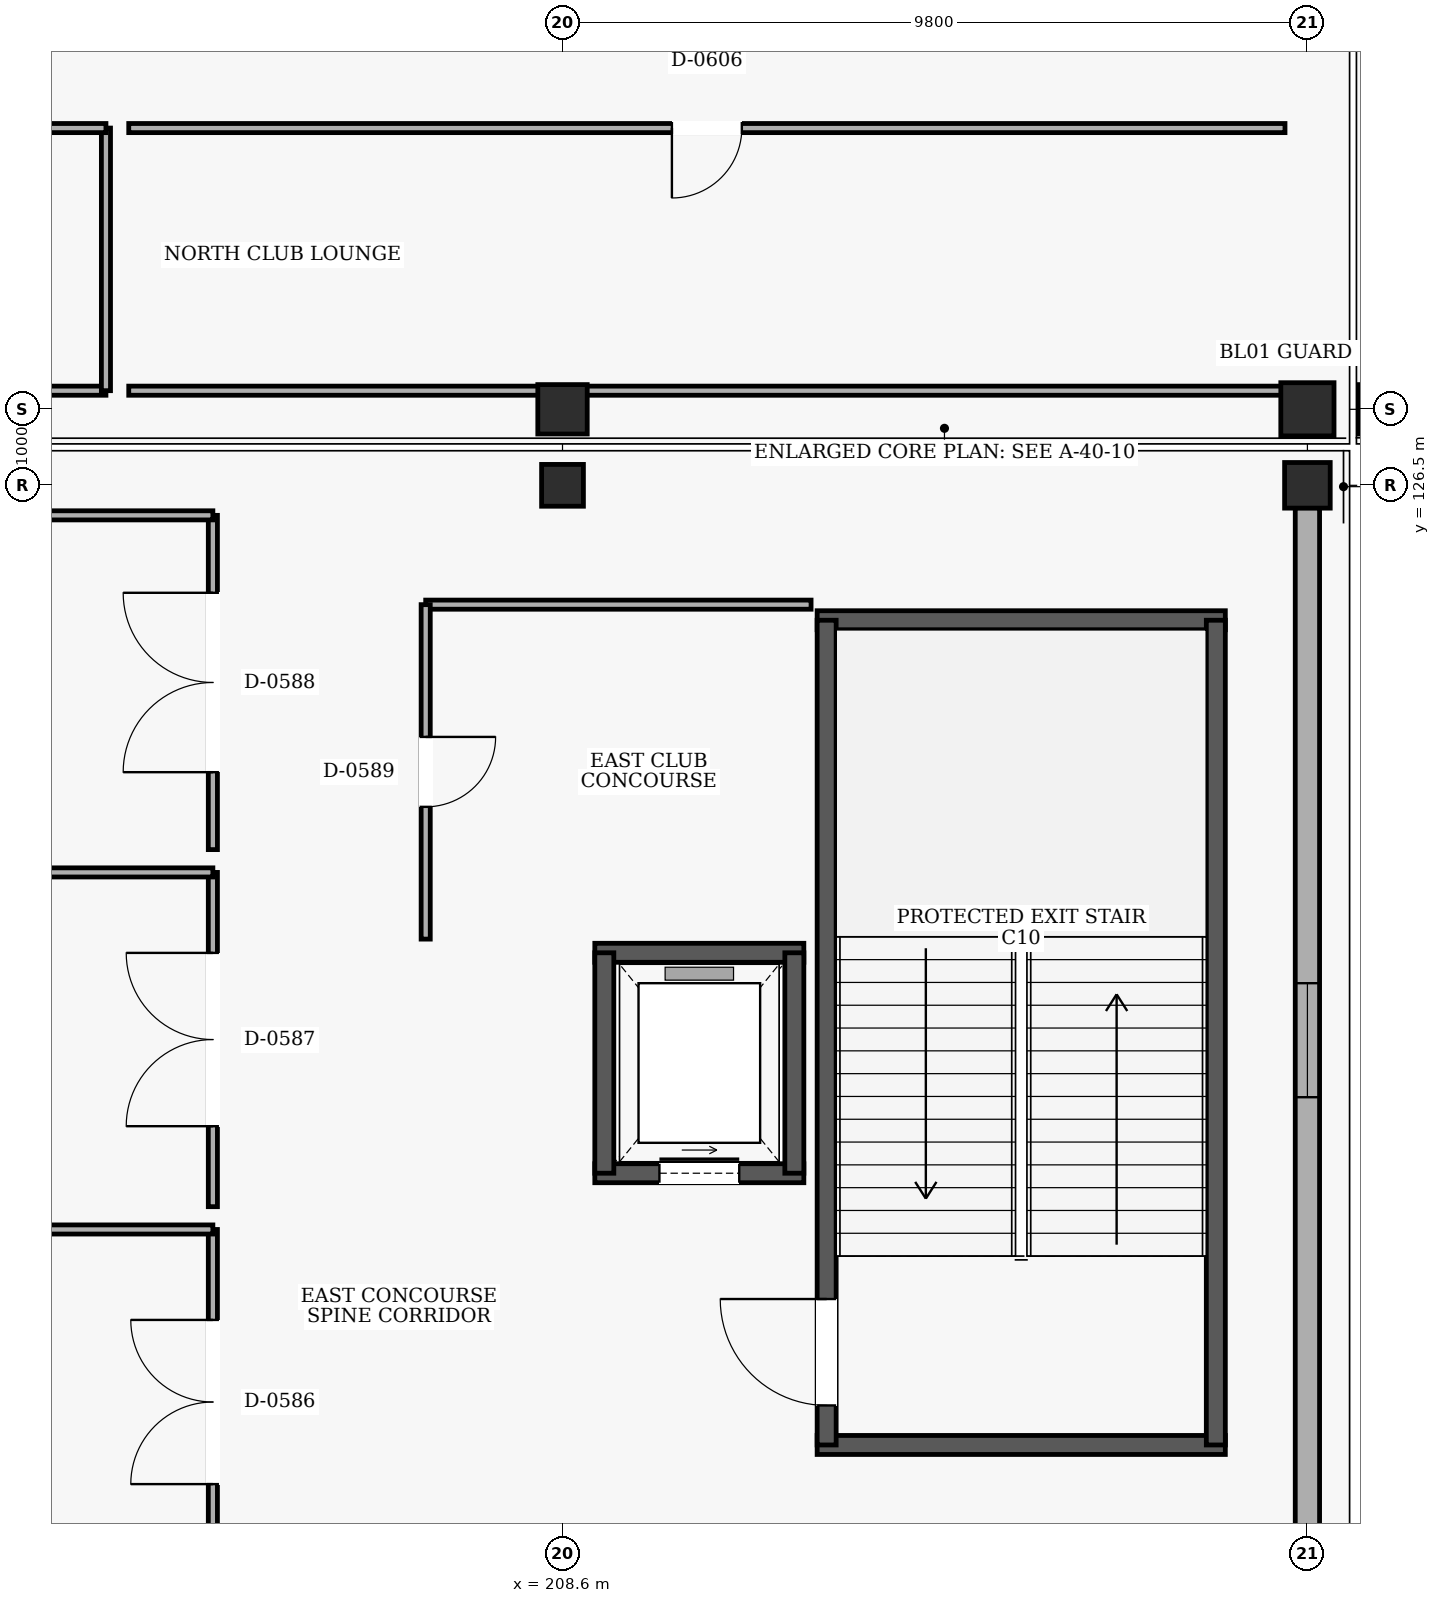
"""IFC4 building model, lengths in metres.
Left out: names, types, materials, properties, quantities, classifications, styles, units other than length and angle.
Written with IfcOpenShell. Run it as: python <this file> out.ifc"""

import sys

from ifc_helpers import new_model, si_unit, direction, frame, frame_2d, origin, origin_2d, place, context, subcontext, project, spatial, rectangle, extrude, element, fill, save


model = new_model("IFC4")
c1 = context("Model", 3, precision=1e-05, world=origin(), true_north=direction((0.0, 1.0)))
c2 = subcontext(c1, "Body", "Model", "MODEL_VIEW")
j1 = project(units=[si_unit("LENGTHUNIT", "METRE"), si_unit("PLANEANGLEUNIT", "RADIAN")], contexts=[c1])
p1 = place(None, origin())
s1 = spatial("IfcSite", under=j1, at=p1, CompositionType="ELEMENT")
p2 = place(p1, origin())
s2 = spatial("IfcBuilding", under=s1, at=p2, CompositionType="ELEMENT")
p3 = place(p2, frame((0.0, 0.0, 10.2)))
s3 = spatial("IfcBuildingStorey", under=s2, at=p3, CompositionType="ELEMENT", Elevation=10.2)
p4 = place(p3, frame((208.6, 126.5, 0.0), z_axis=(0.0, 0.0, 1.0), x_axis=(1.0, 0.0, 0.0)))
e1 = element("IfcColumn", 1, at=p4, inside=s3, PredefinedType="COLUMN", context=c2, shape_type="SweptSolid", body=[
    extrude(rectangle(XDim=0.55, YDim=0.55, at=origin_2d()), origin(), (0.0, 0.0, 1.0), 4.8),
])
p5 = place(p3, frame((208.6, 127.5, 0.0), z_axis=(0.0, 0.0, 1.0), x_axis=(1.0, 0.0, 0.0)))
e2 = element("IfcColumn", 2, at=p5, inside=s3, PredefinedType="COLUMN", context=c2, shape_type="SweptSolid", body=[
    extrude(rectangle(XDim=0.65, YDim=0.65, at=origin_2d()), origin(), (0.0, 0.0, 1.0), 4.8),
])
p6 = place(p3, frame((218.4, 126.5, 0.0), z_axis=(0.0, 0.0, 1.0), x_axis=(1.0, 0.0, 0.0)))
e3 = element("IfcColumn", 3, at=p6, inside=s3, PredefinedType="COLUMN", context=c2, shape_type="SweptSolid", body=[
    extrude(rectangle(XDim=0.6, YDim=0.6, at=origin_2d()), origin(), (0.0, 0.0, 1.0), 4.8),
])
p7 = place(p3, frame((218.4, 127.5, 0.0), z_axis=(0.0, 0.0, 1.0), x_axis=(1.0, 0.0, 0.0)))
e4 = element("IfcColumn", 4, at=p7, inside=s3, PredefinedType="COLUMN", context=c2, shape_type="SweptSolid", body=[
    extrude(rectangle(XDim=0.7, YDim=0.7, at=origin_2d()), origin(), (0.0, 0.0, 1.0), 4.8),
])
p8 = place(p3, frame((219.4, 127.5, 0.0), z_axis=(0.0, 0.0, 1.0), x_axis=(1.0, 0.0, 0.0)))
e5 = element("IfcColumn", 5, at=p8, inside=s3, PredefinedType="COLUMN", context=c2, shape_type="SweptSolid", body=[
    extrude(rectangle(XDim=0.65, YDim=0.65, at=origin_2d()), origin(), (0.0, 0.0, 1.0), 4.8),
])
p9 = place(p3, frame((218.4, 126.205, 0.0), z_axis=(0.0, 0.0, 1.0), x_axis=(0.0, -1.0, 0.0)))
e6 = element("IfcWall", 6, at=p9, inside=s3, PredefinedType="SOLIDWALL", context=c2, shape_type="SweptSolid", body=[
    extrude(rectangle(XDim=14.01, YDim=0.32, at=frame_2d((7.005, 0.0))), origin(), (0.0, 0.0, 1.0), 3.56),
])
p10 = place(p9, frame((6.255, 0.0, 0.9)))
e7 = element("IfcOpeningElement", 7, at=p10, cuts=e6, PredefinedType="OPENING", context=c2, shape_type="SweptSolid", body=[
    extrude(rectangle(XDim=1.5, YDim=1.8, at=frame_2d((0.75, 0.9))), frame((0.0, 0.17, 0.0), z_axis=(0.0, -1.0, 0.0), x_axis=(1.0, 0.0, 0.0)), (0.0, 0.0, 1.0), 0.34),
])
for number, where, z_axis, x_axis in (
    (8, (211.95, 113.875, 0.0), (0.0, 0.0, 1.0), (1.0, 0.0, 0.0)),
    (9, (217.32, 124.725, 0.0), (0.0, 0.0, 1.0), (-1.0, 0.0, 0.0)),
):
    element("IfcWall", number, at=place(p3, frame(where, z_axis=z_axis, x_axis=x_axis)), inside=s3, PredefinedType="SHEAR", context=c2, shape_type="SweptSolid", body=[
        extrude(rectangle(XDim=5.37, YDim=0.25, at=frame_2d((2.685, 0.0))), origin(), (0.0, 0.0, 1.0), 4.48),
    ])
p11 = place(p3, frame((212.075, 113.875, 0.0), z_axis=(0.0, 0.0, 1.0), x_axis=(0.0, 1.0, 0.0)))
e10 = element("IfcWall", 10, at=p11, inside=s3, PredefinedType="SHEAR", context=c2, shape_type="SweptSolid", body=[
    extrude(rectangle(XDim=10.85, YDim=0.25, at=frame_2d((5.425, 0.0))), origin(), (0.0, 0.0, 1.0), 4.48),
])
p12 = place(p11, frame((0.52, 0.0, 0.0)))
e11 = element("IfcOpeningElement", 11, at=p12, cuts=e10, PredefinedType="OPENING", context=c2, shape_type="SweptSolid", body=[
    extrude(rectangle(XDim=1.4, YDim=2.15, at=frame_2d((0.7, 1.075))), frame((0.0, 0.135, 0.0), z_axis=(0.0, -1.0, 0.0), x_axis=(1.0, 0.0, 0.0)), (0.0, 0.0, 1.0), 0.27),
])
p13 = place(p3, frame((217.195, 113.875, 0.0), z_axis=(0.0, 0.0, 1.0), x_axis=(0.0, 1.0, 0.0)))
e12 = element("IfcWall", 12, at=p13, inside=s3, PredefinedType="SHEAR", context=c2, shape_type="SweptSolid", body=[
    extrude(rectangle(XDim=10.85, YDim=0.25, at=frame_2d((5.425, 0.0))), origin(), (0.0, 0.0, 1.0), 4.48),
])
p14 = place(p3, frame((209.025, 117.45, 0.0), z_axis=(0.0, 0.0, 1.0), x_axis=(1.0, 0.0, 0.0)))
e13 = element("IfcWall", 13, at=p14, inside=s3, PredefinedType="SHEAR", context=c2, shape_type="SweptSolid", body=[
    extrude(rectangle(XDim=2.75, YDim=0.25, at=frame_2d((1.375, 0.0))), origin(), (0.0, 0.0, 1.0), 4.48),
])
p15 = place(p14, frame((0.85, 0.0, 0.0)))
e14 = element("IfcOpeningElement", 14, at=p15, cuts=e13, PredefinedType="OPENING", context=c2, shape_type="SweptSolid", body=[
    extrude(rectangle(XDim=1.05, YDim=2.15, at=frame_2d((0.525, 1.075))), frame((0.0, 0.135, 0.0), z_axis=(0.0, -1.0, 0.0), x_axis=(1.0, 0.0, 0.0)), (0.0, 0.0, 1.0), 0.27),
])
p16 = place(p3, frame((211.775, 120.35, 0.0), z_axis=(0.0, 0.0, 1.0), x_axis=(-1.0, 0.0, 0.0)))
e15 = element("IfcWall", 15, at=p16, inside=s3, PredefinedType="SHEAR", context=c2, shape_type="SweptSolid", body=[
    extrude(rectangle(XDim=2.75, YDim=0.25, at=frame_2d((1.375, 0.0))), origin(), (0.0, 0.0, 1.0), 4.48),
])
for number, where, z_axis, x_axis in (
    (16, (209.15, 120.35, 0.0), (0.0, 0.0, 1.0), (0.0, -1.0, 0.0)),
    (17, (211.65, 117.45, 0.0), (0.0, 0.0, 1.0), (0.0, 1.0, 0.0)),
):
    element("IfcWall", number, at=place(p3, frame(where, z_axis=z_axis, x_axis=x_axis)), inside=s3, PredefinedType="SHEAR", context=c2, shape_type="SweptSolid", body=[
        extrude(rectangle(XDim=2.9, YDim=0.25, at=frame_2d((1.45, 0.0))), origin(), (0.0, 0.0, 1.0), 4.48),
    ])
p17 = place(p3, frame((204.0, 112.17, 0.0), z_axis=(0.0, 0.0, 1.0), x_axis=(0.0, 1.0, 0.0)))
e18 = element("IfcWall", 18, at=p17, inside=s3, PredefinedType="PARTITIONING", context=c2, shape_type="SweptSolid", body=[
    extrude(rectangle(XDim=4.54, YDim=0.12, at=frame_2d((2.27, 0.0))), origin(), (0.0, 0.0, 1.0), 4.48),
])
p18 = place(p17, frame((1.19, 0.0, 0.0)))
e19 = element("IfcOpeningElement", 19, at=p18, cuts=e18, PredefinedType="OPENING", context=c2, shape_type="SweptSolid", body=[
    extrude(rectangle(XDim=2.16, YDim=2.35, at=frame_2d((1.08, 1.175))), frame((0.0, 0.07, 0.0), z_axis=(0.0, -1.0, 0.0), x_axis=(1.0, 0.0, 0.0)), (0.0, 0.0, 1.0), 0.14),
])
p19 = place(p3, frame((204.0, 116.71, 0.0), z_axis=(0.0, 0.0, 1.0), x_axis=(-1.0, 0.0, 0.0)))
e20 = element("IfcWall", 20, at=p19, inside=s3, PredefinedType="PARTITIONING", context=c2, shape_type="SweptSolid", body=[
    extrude(rectangle(XDim=20.6, YDim=0.12, at=frame_2d((10.3, 0.0))), origin(), (0.0, 0.0, 1.0), 4.48),
])
p20 = place(p3, frame((204.0, 117.01, 0.0), z_axis=(0.0, 0.0, 1.0), x_axis=(0.0, 1.0, 0.0)))
e21 = element("IfcWall", 21, at=p20, inside=s3, PredefinedType="PARTITIONING", context=c2, shape_type="SweptSolid", body=[
    extrude(rectangle(XDim=4.397, YDim=0.12, at=frame_2d((2.199, 0.0))), origin(), (0.0, 0.0, 1.0), 4.48),
])
p21 = place(p20, frame((1.059, 0.0, 0.0)))
e22 = element("IfcOpeningElement", 22, at=p21, cuts=e21, PredefinedType="OPENING", context=c2, shape_type="SweptSolid", body=[
    extrude(rectangle(XDim=2.28, YDim=2.4, at=frame_2d((1.14, 1.2))), frame((0.0, 0.07, 0.0), z_axis=(0.0, -1.0, 0.0), x_axis=(1.0, 0.0, 0.0)), (0.0, 0.0, 1.0), 0.14),
])
p22 = place(p3, frame((204.0, 121.407, 0.0), z_axis=(0.0, 0.0, 1.0), x_axis=(-1.0, 0.0, 0.0)))
e23 = element("IfcWall", 23, at=p22, inside=s3, PredefinedType="PARTITIONING", context=c2, shape_type="SweptSolid", body=[
    extrude(rectangle(XDim=20.6, YDim=0.12, at=frame_2d((10.3, 0.0))), origin(), (0.0, 0.0, 1.0), 4.48),
])
p23 = place(p3, frame((204.0, 121.708, 0.0), z_axis=(0.0, 0.0, 1.0), x_axis=(0.0, 1.0, 0.0)))
e24 = element("IfcWall", 24, at=p23, inside=s3, PredefinedType="PARTITIONING", context=c2, shape_type="SweptSolid", body=[
    extrude(rectangle(XDim=4.397, YDim=0.12, at=frame_2d((2.199, 0.0))), origin(), (0.0, 0.0, 1.0), 4.48),
])
p24 = place(p23, frame((1.019, 0.0, 0.0)))
e25 = element("IfcOpeningElement", 25, at=p24, cuts=e24, PredefinedType="OPENING", context=c2, shape_type="SweptSolid", body=[
    extrude(rectangle(XDim=2.36, YDim=2.4, at=frame_2d((1.18, 1.2))), frame((0.0, 0.07, 0.0), z_axis=(0.0, -1.0, 0.0), x_axis=(1.0, 0.0, 0.0)), (0.0, 0.0, 1.0), 0.14),
])
p25 = place(p3, frame((204.0, 126.105, 0.0), z_axis=(0.0, 0.0, 1.0), x_axis=(-1.0, 0.0, 0.0)))
e26 = element("IfcWall", 26, at=p25, inside=s3, PredefinedType="PARTITIONING", context=c2, shape_type="SweptSolid", body=[
    extrude(rectangle(XDim=20.6, YDim=0.12, at=frame_2d((10.3, 0.0))), origin(), (0.0, 0.0, 1.0), 3.76),
])
p26 = place(p3, frame((211.87, 124.93, 0.0), z_axis=(0.0, 0.0, 1.0), x_axis=(-1.0, 0.0, 0.0)))
e27 = element("IfcWall", 27, at=p26, inside=s3, PredefinedType="PARTITIONING", context=c2, shape_type="SweptSolid", body=[
    extrude(rectangle(XDim=5.07, YDim=0.12, at=frame_2d((2.535, 0.0))), origin(), (0.0, 0.0, 1.0), 4.48),
])
p27 = place(p3, frame((206.8, 124.93, 0.0), z_axis=(0.0, 0.0, 1.0), x_axis=(0.0, -1.0, 0.0)))
e28 = element("IfcWall", 28, at=p27, inside=s3, PredefinedType="PARTITIONING", context=c2, shape_type="SweptSolid", body=[
    extrude(rectangle(XDim=4.4, YDim=0.12, at=frame_2d((2.2, 0.0))), origin(), (0.0, 0.0, 1.0), 4.48),
])
p28 = place(p27, frame((1.74, 0.0, 0.0)))
e29 = element("IfcOpeningElement", 29, at=p28, cuts=e28, PredefinedType="OPENING", context=c2, shape_type="SweptSolid", body=[
    extrude(rectangle(XDim=0.92, YDim=2.1, at=frame_2d((0.46, 1.05))), frame((0.0, 0.07, 0.0), z_axis=(0.0, -1.0, 0.0), x_axis=(1.0, 0.0, 0.0)), (0.0, 0.0, 1.0), 0.14),
])
p29 = place(p3, frame((187.382, 127.745, 0.0), z_axis=(0.0, 0.0, 1.0), x_axis=(1.0, 0.0, 0.0)))
e30 = element("IfcWall", 30, at=p29, inside=s3, PredefinedType="PARTITIONING", context=c2, shape_type="SweptSolid", body=[
    extrude(rectangle(XDim=15.212, YDim=0.12, at=frame_2d((7.606, 0.0))), origin(), (0.0, 0.0, 1.0), 3.76),
])
p30 = place(p3, frame((202.593, 127.745, 0.0), z_axis=(0.0, 0.0, 1.0), x_axis=(0.0, 1.0, 0.0)))
e31 = element("IfcWall", 31, at=p30, inside=s3, PredefinedType="PARTITIONING", context=c2, shape_type="SweptSolid", body=[
    extrude(rectangle(XDim=3.455, YDim=0.12, at=frame_2d((1.728, 0.0))), origin(), (0.0, 0.0, 1.0), 4.48),
])
p31 = place(p3, frame((202.593, 131.2, 0.0), z_axis=(0.0, 0.0, 1.0), x_axis=(-1.0, 0.0, 0.0)))
e32 = element("IfcWall", 32, at=p31, inside=s3, PredefinedType="PARTITIONING", context=c2, shape_type="SweptSolid", body=[
    extrude(rectangle(XDim=15.212, YDim=0.12, at=frame_2d((7.606, 0.0))), origin(), (0.0, 0.0, 1.0), 4.48),
])
p32 = place(p31, frame((6.426, 0.0, 0.0)))
e33 = element("IfcOpeningElement", 33, at=p32, cuts=e32, PredefinedType="OPENING", context=c2, shape_type="SweptSolid", body=[
    extrude(rectangle(XDim=2.36, YDim=2.4, at=frame_2d((1.18, 1.2))), frame((0.0, 0.07, 0.0), z_axis=(0.0, -1.0, 0.0), x_axis=(1.0, 0.0, 0.0)), (0.0, 0.0, 1.0), 0.14),
])
p33 = place(p3, frame((202.893, 127.745, 0.0), z_axis=(0.0, 0.0, 1.0), x_axis=(1.0, 0.0, 0.0)))
e34 = element("IfcWall", 34, at=p33, inside=s3, PredefinedType="PARTITIONING", context=c2, shape_type="SweptSolid", body=[
    extrude(rectangle(XDim=15.212, YDim=0.12, at=frame_2d((7.606, 0.0))), origin(), (0.0, 0.0, 1.0), 3.76),
])
p34 = place(p3, frame((218.105, 131.2, 0.0), z_axis=(0.0, 0.0, 1.0), x_axis=(-1.0, 0.0, 0.0)))
e35 = element("IfcWall", 35, at=p34, inside=s3, PredefinedType="PARTITIONING", context=c2, shape_type="SweptSolid", body=[
    extrude(rectangle(XDim=15.212, YDim=0.12, at=frame_2d((7.606, 0.0))), origin(), (0.0, 0.0, 1.0), 4.48),
])
p35 = place(p34, frame((7.146, 0.0, 0.0)))
e36 = element("IfcOpeningElement", 36, at=p35, cuts=e35, PredefinedType="OPENING", context=c2, shape_type="SweptSolid", body=[
    extrude(rectangle(XDim=0.92, YDim=2.1, at=frame_2d((0.46, 1.05))), frame((0.0, 0.07, 0.0), z_axis=(0.0, -1.0, 0.0), x_axis=(1.0, 0.0, 0.0)), (0.0, 0.0, 1.0), 0.14),
])
p36 = place(p10, origin())
e37 = element("IfcWindow", 37, at=p36, inside=s3, PartitioningType="SINGLE_PANEL", PredefinedType="WINDOW", context=c2, shape_type="SweptSolid", body=[
    extrude(rectangle(XDim=1.5, YDim=1.8, at=frame_2d((0.75, 0.9))), frame((0.0, 0.03, 0.0), z_axis=(0.0, -1.0, 0.0), x_axis=(1.0, 0.0, 0.0)), (0.0, 0.0, 1.0), 0.06),
])
fill(e7, e37)
p37 = place(p12, frame((1.4, 0.0, 0.0), z_axis=(0.0, 0.0, 1.0), x_axis=(-1.0, 0.0, 0.0)))
e38 = element("IfcDoor", 38, at=p37, inside=s3, OperationType="SINGLE_SWING_LEFT", PredefinedType="DOOR", context=c2, shape_type="SweptSolid", body=[
    extrude(rectangle(XDim=1.4, YDim=2.15, at=frame_2d((0.7, 1.075))), frame((0.0, 0.025, 0.0), z_axis=(0.0, -1.0, 0.0), x_axis=(1.0, 0.0, 0.0)), (0.0, 0.0, 1.0), 0.05),
])
fill(e11, e38)
p38 = place(p15, origin())
e39 = element("IfcDoor", 39, at=p38, inside=s3, OperationType="SLIDING_TO_LEFT", PredefinedType="DOOR", context=c2, shape_type="SweptSolid", body=[
    extrude(rectangle(XDim=1.05, YDim=2.15, at=frame_2d((0.525, 1.075))), frame((0.0, 0.025, 0.0), z_axis=(0.0, -1.0, 0.0), x_axis=(1.0, 0.0, 0.0)), (0.0, 0.0, 1.0), 0.05),
])
fill(e14, e39)
p39 = place(p18, origin())
e40 = element("IfcDoor", 40, at=p39, inside=s3, OperationType="DOUBLE_DOOR_SINGLE_SWING", PredefinedType="DOOR", context=c2, shape_type="SweptSolid", body=[
    extrude(rectangle(XDim=2.16, YDim=2.35, at=frame_2d((1.08, 1.175))), frame((0.0, 0.025, 0.0), z_axis=(0.0, -1.0, 0.0), x_axis=(1.0, 0.0, 0.0)), (0.0, 0.0, 1.0), 0.05),
])
fill(e19, e40)
p40 = place(p21, origin())
e41 = element("IfcDoor", 41, at=p40, inside=s3, OperationType="DOUBLE_DOOR_SINGLE_SWING", PredefinedType="DOOR", context=c2, shape_type="SweptSolid", body=[
    extrude(rectangle(XDim=2.28, YDim=2.4, at=frame_2d((1.14, 1.2))), frame((0.0, 0.025, 0.0), z_axis=(0.0, -1.0, 0.0), x_axis=(1.0, 0.0, 0.0)), (0.0, 0.0, 1.0), 0.05),
])
fill(e22, e41)
p41 = place(p24, origin())
e42 = element("IfcDoor", 42, at=p41, inside=s3, OperationType="DOUBLE_DOOR_SINGLE_SWING", PredefinedType="DOOR", context=c2, shape_type="SweptSolid", body=[
    extrude(rectangle(XDim=2.36, YDim=2.4, at=frame_2d((1.18, 1.2))), frame((0.0, 0.025, 0.0), z_axis=(0.0, -1.0, 0.0), x_axis=(1.0, 0.0, 0.0)), (0.0, 0.0, 1.0), 0.05),
])
fill(e25, e42)
p42 = place(p28, origin())
e43 = element("IfcDoor", 43, at=p42, inside=s3, OperationType="SINGLE_SWING_LEFT", PredefinedType="DOOR", context=c2, shape_type="SweptSolid", body=[
    extrude(rectangle(XDim=0.92, YDim=2.1, at=frame_2d((0.46, 1.05))), frame((0.0, 0.025, 0.0), z_axis=(0.0, -1.0, 0.0), x_axis=(1.0, 0.0, 0.0)), (0.0, 0.0, 1.0), 0.05),
])
fill(e29, e43)
p43 = place(p35, origin())
e44 = element("IfcDoor", 44, at=p43, inside=s3, OperationType="SINGLE_SWING_RIGHT", PredefinedType="DOOR", context=c2, shape_type="SweptSolid", body=[
    extrude(rectangle(XDim=0.92, YDim=2.1, at=frame_2d((0.46, 1.05))), frame((0.0, 0.025, 0.0), z_axis=(0.0, -1.0, 0.0), x_axis=(1.0, 0.0, 0.0)), (0.0, 0.0, 1.0), 0.05),
])
fill(e36, e44)
save(model, sys.argv[1])
